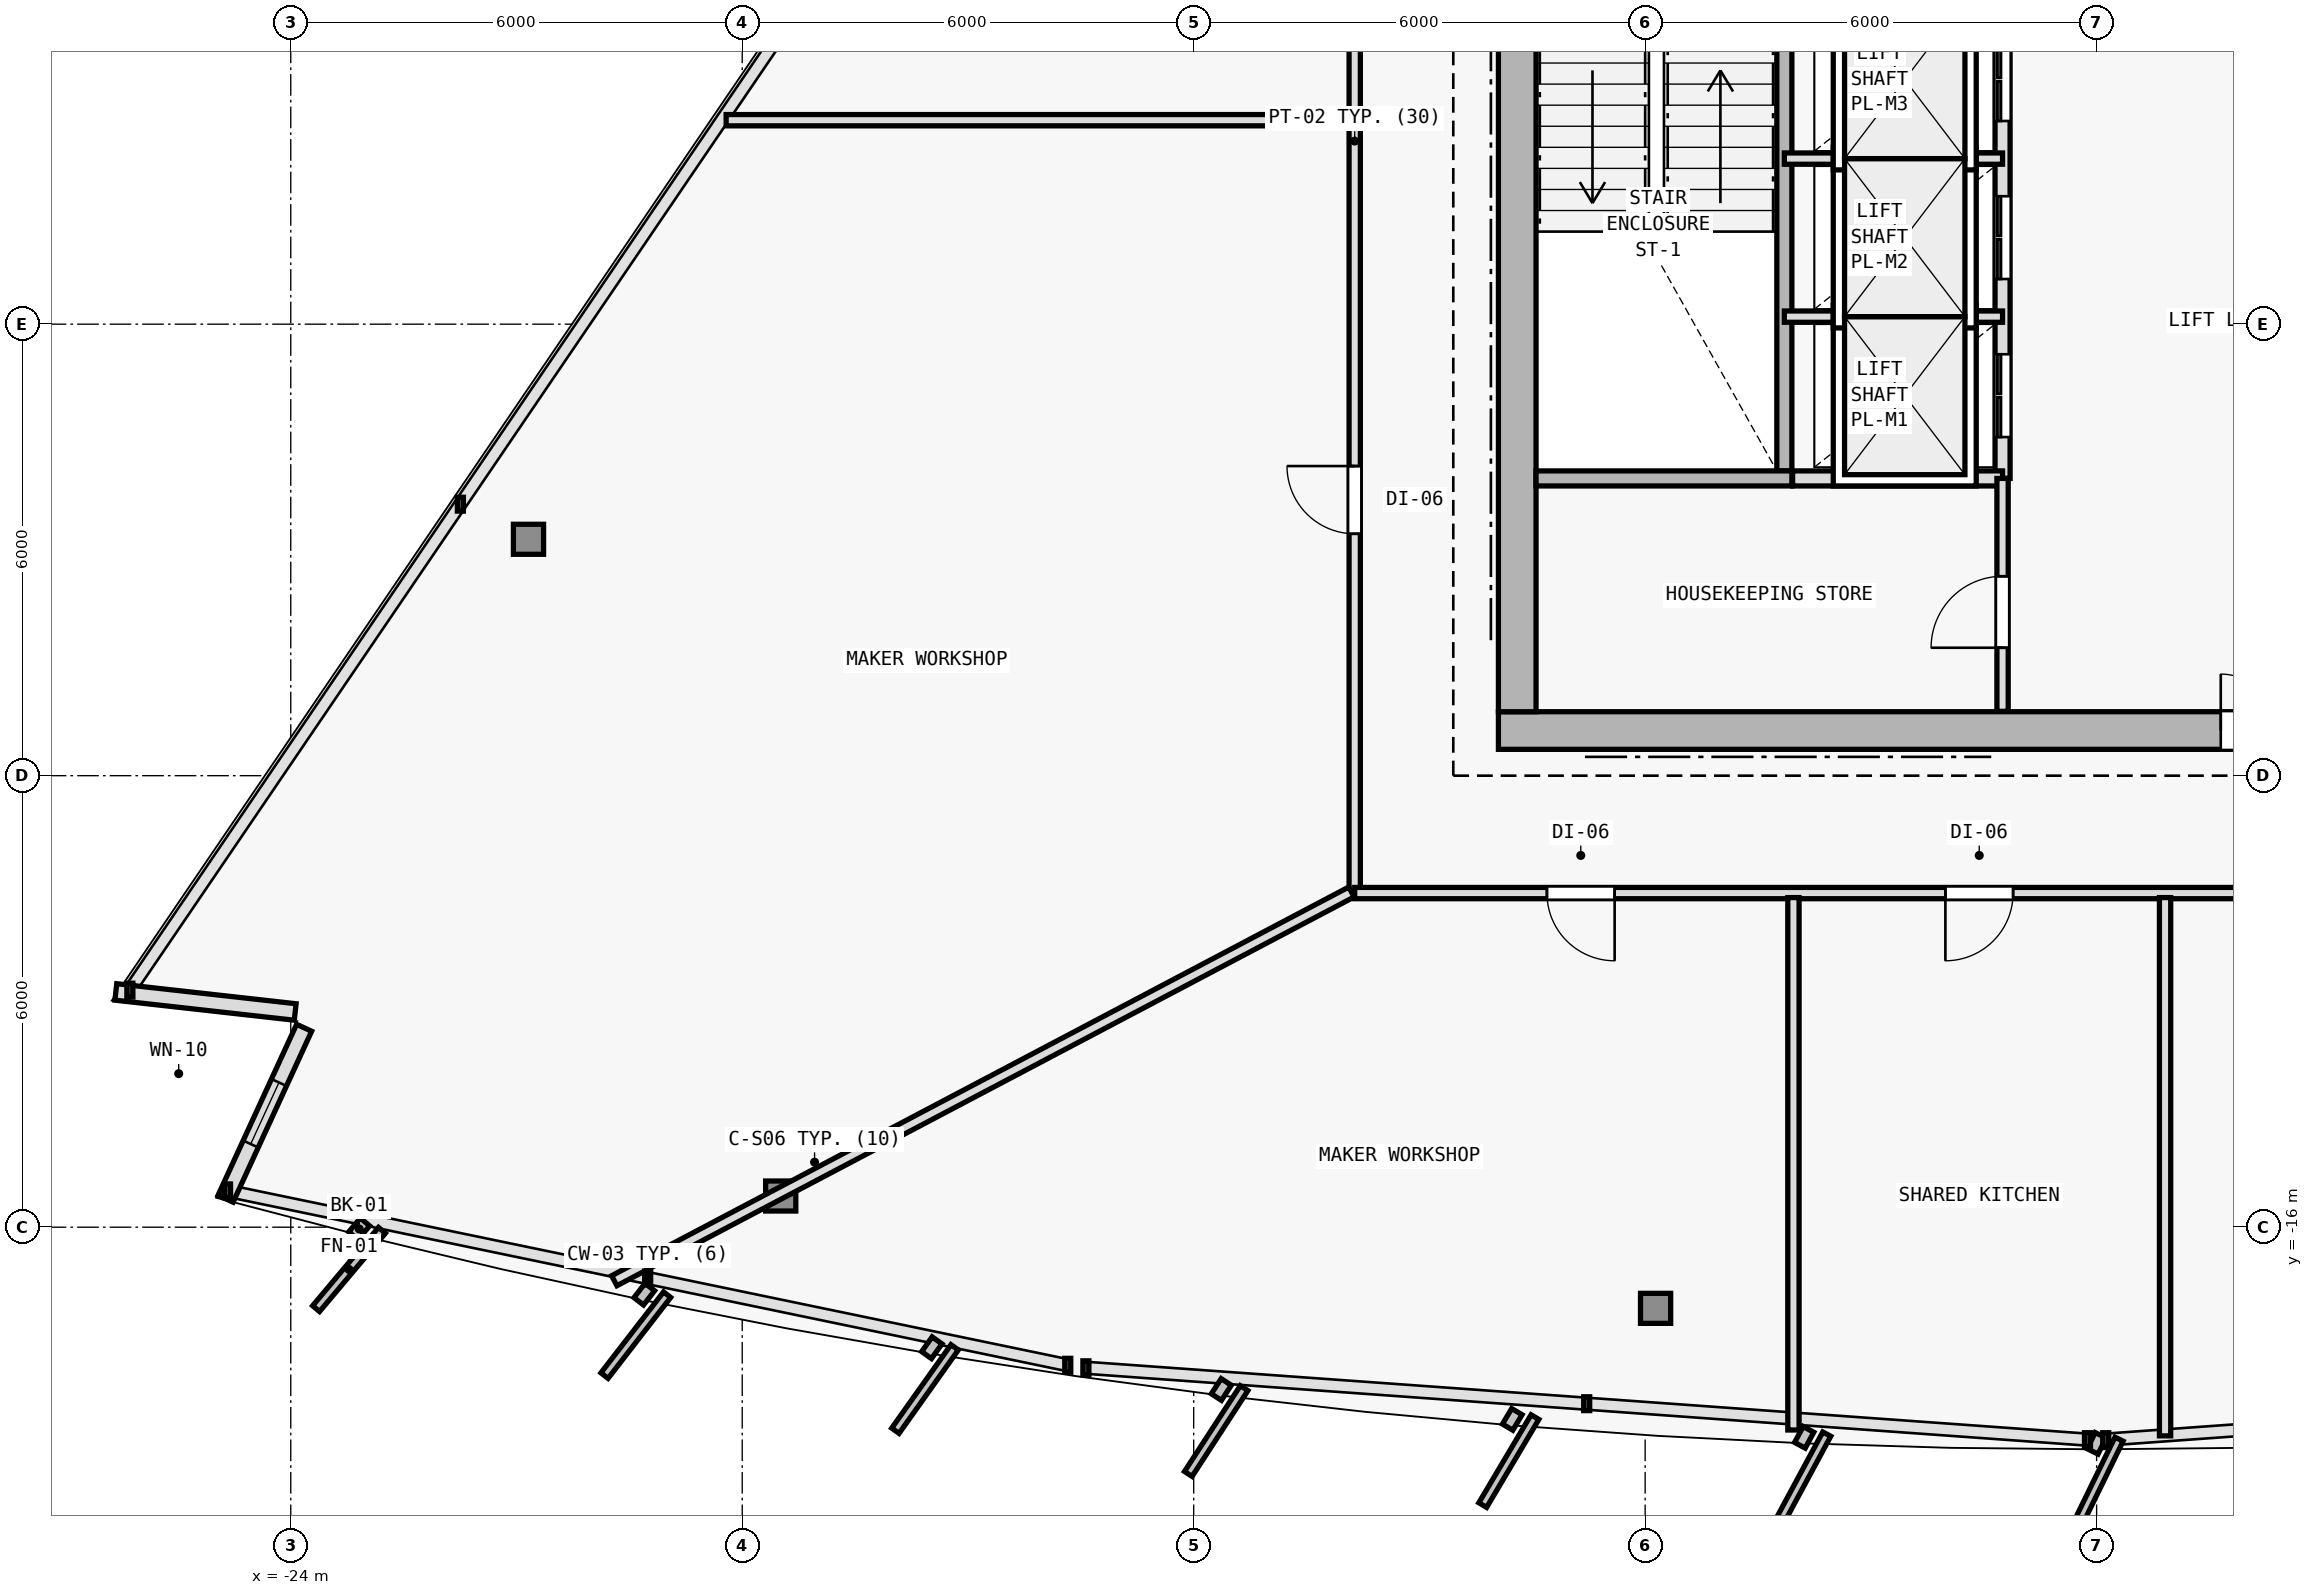
"""IFC4 building model, lengths in metres.
Left out: names, types, materials, properties, quantities, classifications, styles, units other than length and angle.
Written with IfcOpenShell. Run it as: python <this file> out.ifc"""

import sys

from ifc_helpers import new_model, si_unit, direction, frame, frame_2d, origin, origin_2d, place, context, subcontext, project, spatial, rectangle, i_section, extrude, element, fill, save


model = new_model("IFC4")
c1 = context("Model", 3, precision=1e-05, world=origin(), true_north=direction((0.0, 1.0)))
c2 = subcontext(c1, "Body", "Model", "MODEL_VIEW")
j1 = project(units=[si_unit("LENGTHUNIT", "METRE"), si_unit("PLANEANGLEUNIT", "RADIAN")], contexts=[c1])
p1 = place(None, origin())
s1 = spatial("IfcSite", under=j1, at=p1, CompositionType="ELEMENT")
p2 = place(p1, origin())
s2 = spatial("IfcBuilding", under=s1, at=p2, CompositionType="ELEMENT")
p3 = place(p2, frame((0.0, 0.0, 171.0)))
s3 = spatial("IfcBuildingStorey", under=s2, at=p3, CompositionType="ELEMENT", Elevation=171.0)
for number, where, z_axis, x_axis in (
    (1, (-7.7, -9.4, 0.0), (0.0, 0.0, 1.0), (1.0, 0.0, 0.0)),
    (2, (0.0, -9.4, 0.0), (0.0, 0.0, 1.0), (1.0, 0.0, 0.0)),
):
    element("IfcColumn", number, at=place(p3, frame(where, z_axis=z_axis, x_axis=x_axis)), inside=s3, PredefinedType="COLUMN", context=c2, shape_type="SweptSolid", body=[
        extrude(i_section(OverallWidth=0.404, OverallDepth=0.407, WebThickness=0.017, FlangeThickness=0.028, FilletRadius=0.015, at=origin_2d()), origin(), (0.0, 0.0, 1.0), 3.6),
    ])
p4 = place(p3, frame((-17.489, -15.586, 0.006), z_axis=(0.020596292833, 0.033511459955, 0.999226087917), x_axis=(-0.851954850327, 0.523615252838, 0.0)))
e3 = element("IfcColumn", 3, at=p4, inside=s3, PredefinedType="COLUMN", context=c2, shape_type="SweptSolid", body=[
    extrude(i_section(OverallWidth=0.401, OverallDepth=0.399, WebThickness=0.016, FlangeThickness=0.025, FilletRadius=0.015, at=origin_2d()), origin(), (0.0, 0.0, 1.0), 3.592),
])
p5 = place(p3, frame((-5.861, -17.079, 0.006), z_axis=(0.006934288159, 0.035283289748, 0.999353293441), x_axis=(-0.981229659911, 0.192842823335, 0.0)))
e4 = element("IfcColumn", 4, at=p5, inside=s3, PredefinedType="COLUMN", context=c2, shape_type="SweptSolid", body=[
    extrude(i_section(OverallWidth=0.401, OverallDepth=0.399, WebThickness=0.016, FlangeThickness=0.025, FilletRadius=0.015, at=origin_2d()), origin(), (0.0, 0.0, 1.0), 3.591),
])
p6 = place(p3, frame((-20.841, -6.859, 0.006), z_axis=(0.025224163578, 0.021620711639, 0.999447990843), x_axis=(-0.650791373456, 0.759256602365, 0.0)))
e5 = element("IfcColumn", 5, at=p6, inside=s3, PredefinedType="COLUMN", context=c2, shape_type="SweptSolid", body=[
    extrude(i_section(OverallWidth=0.401, OverallDepth=0.399, WebThickness=0.016, FlangeThickness=0.025, FilletRadius=0.015, at=origin_2d()), origin(), (0.0, 0.0, 1.0), 3.591),
])
p7 = place(p3, frame((-23.941, -13.14, 0.0), z_axis=(0.0, 0.0, 1.0), x_axis=(-0.993825249999, 0.110956624245, 0.0)))
e6 = element("IfcWall", 6, at=p7, inside=s3, PredefinedType="SOLIDWALL", context=c2, shape_type="SweptSolid", body=[
    extrude(rectangle(XDim=2.398, YDim=0.22, at=frame_2d((1.199, 0.0))), origin(), (0.0, 0.0, 1.0), 3.35),
])
p8 = place(p3, frame((-24.866, -15.622, 0.0), z_axis=(0.0, 0.0, 1.0), x_axis=(0.417478378529, 0.908686856657, 0.0)))
e7 = element("IfcWall", 7, at=p8, inside=s3, PredefinedType="SOLIDWALL", context=c2, shape_type="SweptSolid", body=[
    extrude(rectangle(XDim=2.5, YDim=0.22, at=frame_2d((1.25, 0.0))), origin(), (0.0, 0.0, 1.0), 3.35),
])
p9 = place(p8, frame((0.8, 0.0, 0.62)))
e8 = element("IfcOpeningElement", 8, at=p9, cuts=e7, PredefinedType="OPENING", context=c2, shape_type="SweptSolid", body=[
    extrude(rectangle(XDim=0.9, YDim=1.6, at=frame_2d((0.45, 0.8))), frame((0.0, 0.12, 0.0), z_axis=(0.0, -1.0, 0.0), x_axis=(1.0, 0.0, 0.0)), (0.0, 0.0, 1.0), 0.24),
])
p10 = place(p3, frame((-7.95, -9.4, 0.0), z_axis=(0.0, 0.0, 1.0), x_axis=(1.0, 0.0, 0.0)))
e9 = element("IfcWall", 9, at=p10, inside=s3, PredefinedType="SHEAR", context=c2, shape_type="SweptSolid", body=[
    extrude(rectangle(XDim=15.9, YDim=0.5, at=frame_2d((7.95, 0.0))), origin(), (0.0, 0.0, 1.0), 3.35),
])
p11 = place(p10, frame((9.6, 0.0, 0.0)))
e10 = element("IfcOpeningElement", 10, at=p11, cuts=e9, PredefinedType="OPENING", context=c2, shape_type="SweptSolid", body=[
    extrude(rectangle(XDim=1.5, YDim=2.2, at=frame_2d((0.75, 1.1))), frame((0.0, 0.26, 0.0), z_axis=(0.0, -1.0, 0.0), x_axis=(1.0, 0.0, 0.0)), (0.0, 0.0, 1.0), 0.52),
])
p12 = place(p3, frame((-7.7, -9.15, 0.0), z_axis=(0.0, 0.0, 1.0), x_axis=(0.0, 1.0, 0.0)))
e11 = element("IfcWall", 11, at=p12, inside=s3, PredefinedType="SHEAR", context=c2, shape_type="SweptSolid", body=[
    extrude(rectangle(XDim=19.1, YDim=0.5, at=frame_2d((9.55, 0.0))), origin(), (0.0, 0.0, 1.0), 3.35),
])
p13 = place(p12, frame((12.7, 0.0, 0.0)))
e12 = element("IfcOpeningElement", 12, at=p13, cuts=e11, PredefinedType="OPENING", context=c2, shape_type="SweptSolid", body=[
    extrude(rectangle(XDim=1.1, YDim=2.15, at=frame_2d((0.55, 1.075))), frame((0.0, 0.26, 0.0), z_axis=(0.0, -1.0, 0.0), x_axis=(1.0, 0.0, 0.0)), (0.0, 0.0, 1.0), 0.52),
])
p14 = place(p3, frame((-4.15, -5.95, 0.0), z_axis=(0.0, 0.0, 1.0), x_axis=(0.0, 1.0, 0.0)))
e13 = element("IfcWall", 13, at=p14, inside=s3, PredefinedType="SOLIDWALL", context=c2, shape_type="SweptSolid", body=[
    extrude(rectangle(XDim=7.2, YDim=0.2, at=frame_2d((3.6, 0.0))), origin(), (0.0, 0.0, 1.0), 3.35),
])
p15 = place(p3, frame((-1.25, -6.05, 0.0), z_axis=(0.0, 0.0, 1.0), x_axis=(0.0, 1.0, 0.0)))
e14 = element("IfcWall", 14, at=p15, inside=s3, PredefinedType="SOLIDWALL", context=c2, shape_type="SweptSolid", body=[
    extrude(rectangle(XDim=8.7, YDim=0.2, at=frame_2d((4.35, 0.0))), origin(), (0.0, 0.0, 1.0), 3.35),
])
p16 = place(p15, frame((0.55, 0.0, 0.0)))
e15 = element("IfcOpeningElement", 15, at=p16, cuts=e14, PredefinedType="OPENING", context=c2, shape_type="SweptSolid", body=[
    extrude(rectangle(XDim=1.1, YDim=2.15, at=frame_2d((0.55, 1.075))), frame((0.0, 0.11, 0.0), z_axis=(0.0, -1.0, 0.0), x_axis=(1.0, 0.0, 0.0)), (0.0, 0.0, 1.0), 0.22),
])
p17 = place(p15, frame((2.65, 0.0, 0.0)))
e16 = element("IfcOpeningElement", 16, at=p17, cuts=e14, PredefinedType="OPENING", context=c2, shape_type="SweptSolid", body=[
    extrude(rectangle(XDim=1.1, YDim=2.15, at=frame_2d((0.55, 1.075))), frame((0.0, 0.11, 0.0), z_axis=(0.0, -1.0, 0.0), x_axis=(1.0, 0.0, 0.0)), (0.0, 0.0, 1.0), 0.22),
])
p18 = place(p15, frame((4.75, 0.0, 0.0)))
e17 = element("IfcOpeningElement", 17, at=p18, cuts=e14, PredefinedType="OPENING", context=c2, shape_type="SweptSolid", body=[
    extrude(rectangle(XDim=1.1, YDim=2.15, at=frame_2d((0.55, 1.075))), frame((0.0, 0.11, 0.0), z_axis=(0.0, -1.0, 0.0), x_axis=(1.0, 0.0, 0.0)), (0.0, 0.0, 1.0), 0.22),
])
p19 = place(p15, frame((6.85, 0.0, 0.0)))
e18 = element("IfcOpeningElement", 18, at=p19, cuts=e14, PredefinedType="OPENING", context=c2, shape_type="SweptSolid", body=[
    extrude(rectangle(XDim=1.1, YDim=2.15, at=frame_2d((0.55, 1.075))), frame((0.0, 0.11, 0.0), z_axis=(0.0, -1.0, 0.0), x_axis=(1.0, 0.0, 0.0)), (0.0, 0.0, 1.0), 0.22),
])
for number, where, z_axis, x_axis in (
    (19, (-4.15, -3.9, 0.0), (0.0, 0.0, 1.0), (1.0, 0.0, 0.0)),
    (20, (-4.15, -1.8, 0.0), (0.0, 0.0, 1.0), (1.0, 0.0, 0.0)),
):
    element("IfcWall", number, at=place(p3, frame(where, z_axis=z_axis, x_axis=x_axis)), inside=s3, PredefinedType="PARTITIONING", context=c2, shape_type="SweptSolid", body=[
        extrude(rectangle(XDim=2.9, YDim=0.15, at=frame_2d((1.45, 0.0))), origin(), (0.0, 0.0, 1.0), 3.35),
    ])
p20 = place(p3, frame((-7.45, -6.05, 0.0), z_axis=(0.0, 0.0, 1.0), x_axis=(1.0, 0.0, 0.0)))
e21 = element("IfcWall", 21, at=p20, inside=s3, PredefinedType="SOLIDWALL", context=c2, shape_type="SweptSolid", body=[
    extrude(rectangle(XDim=3.4, YDim=0.2, at=frame_2d((1.7, 0.0))), origin(), (0.0, 0.0, 1.0), 3.35),
])
p21 = place(p3, frame((-4.04, -6.05, 0.0), z_axis=(0.0, 0.0, 1.0), x_axis=(1.0, 0.0, 0.0)))
e22 = element("IfcWall", 22, at=p21, inside=s3, PredefinedType="SOLIDWALL", context=c2, shape_type="SweptSolid", body=[
    extrude(rectangle(XDim=2.79, YDim=0.2, at=frame_2d((1.395, 0.0))), origin(), (0.0, 0.0, 1.0), 3.35),
])
p22 = place(p3, frame((-1.25, -9.145, 0.0), z_axis=(0.0, 0.0, 1.0), x_axis=(0.0, 1.0, 0.0)))
e23 = element("IfcWall", 23, at=p22, inside=s3, PredefinedType="PARTITIONING", context=c2, shape_type="SweptSolid", body=[
    extrude(rectangle(XDim=3.095, YDim=0.15, at=frame_2d((1.547, 0.0))), origin(), (0.0, 0.0, 1.0), 3.35),
])
p23 = place(p22, frame((0.845, 0.0, 0.0)))
e24 = element("IfcOpeningElement", 24, at=p23, cuts=e23, PredefinedType="OPENING", context=c2, shape_type="SweptSolid", body=[
    extrude(rectangle(XDim=0.95, YDim=2.1, at=frame_2d((0.475, 1.05))), frame((0.0, 0.085, 0.0), z_axis=(0.0, -1.0, 0.0), x_axis=(1.0, 0.0, 0.0)), (0.0, 0.0, 1.0), 0.17),
])
p24 = place(p3, frame((-9.86, -11.56, 0.0), z_axis=(0.0, 0.0, 1.0), x_axis=(0.0, 1.0, 0.0)))
e25 = element("IfcWall", 25, at=p24, inside=s3, PredefinedType="PARTITIONING", context=c2, shape_type="SweptSolid", body=[
    extrude(rectangle(XDim=19.986, YDim=0.15, at=frame_2d((9.993, 0.0))), origin(), (0.0, 0.0, 1.0), 2.825),
])
p25 = place(p24, frame((4.774, 0.0, 0.0)))
e26 = element("IfcOpeningElement", 26, at=p25, cuts=e25, PredefinedType="OPENING", context=c2, shape_type="SweptSolid", body=[
    extrude(rectangle(XDim=0.9, YDim=2.1, at=frame_2d((0.45, 1.05))), frame((0.0, 0.085, 0.0), z_axis=(0.0, -1.0, 0.0), x_axis=(1.0, 0.0, 0.0)), (0.0, 0.0, 1.0), 0.17),
])
p26 = place(p24, frame((14.589, 0.0, 0.0)))
e27 = element("IfcOpeningElement", 27, at=p26, cuts=e25, PredefinedType="OPENING", context=c2, shape_type="SweptSolid", body=[
    extrude(rectangle(XDim=0.9, YDim=2.1, at=frame_2d((0.45, 1.05))), frame((0.0, 0.085, 0.0), z_axis=(0.0, -1.0, 0.0), x_axis=(1.0, 0.0, 0.0)), (0.0, 0.0, 1.0), 0.17),
])
p27 = place(p3, frame((13.18, -11.56, 0.0), z_axis=(0.0, 0.0, 1.0), x_axis=(-1.0, 0.0, 0.0)))
e28 = element("IfcWall", 28, at=p27, inside=s3, PredefinedType="PARTITIONING", context=c2, shape_type="SweptSolid", body=[
    extrude(rectangle(XDim=23.04, YDim=0.15, at=frame_2d((11.52, 0.0))), origin(), (0.0, 0.0, 1.0), 2.825),
])
p28 = place(p27, frame((19.585, 0.0, 0.0)))
e29 = element("IfcOpeningElement", 29, at=p28, cuts=e28, PredefinedType="OPENING", context=c2, shape_type="SweptSolid", body=[
    extrude(rectangle(XDim=0.9, YDim=2.1, at=frame_2d((0.45, 1.05))), frame((0.0, 0.085, 0.0), z_axis=(0.0, -1.0, 0.0), x_axis=(1.0, 0.0, 0.0)), (0.0, 0.0, 1.0), 0.17),
])
p29 = place(p27, frame((14.29, 0.0, 0.0)))
e30 = element("IfcOpeningElement", 30, at=p29, cuts=e28, PredefinedType="OPENING", context=c2, shape_type="SweptSolid", body=[
    extrude(rectangle(XDim=0.9, YDim=2.1, at=frame_2d((0.45, 1.05))), frame((0.0, 0.085, 0.0), z_axis=(0.0, -1.0, 0.0), x_axis=(1.0, 0.0, 0.0)), (0.0, 0.0, 1.0), 0.17),
])
p30 = place(p27, frame((9.351, 0.0, 0.0)))
e31 = element("IfcOpeningElement", 31, at=p30, cuts=e28, PredefinedType="OPENING", context=c2, shape_type="SweptSolid", body=[
    extrude(rectangle(XDim=0.9, YDim=2.1, at=frame_2d((0.45, 1.05))), frame((0.0, 0.085, 0.0), z_axis=(0.0, -1.0, 0.0), x_axis=(1.0, 0.0, 0.0)), (0.0, 0.0, 1.0), 0.17),
])
p31 = place(p27, frame((3.305, 0.0, 0.0)))
e32 = element("IfcOpeningElement", 32, at=p31, cuts=e28, PredefinedType="OPENING", context=c2, shape_type="SweptSolid", body=[
    extrude(rectangle(XDim=0.9, YDim=2.1, at=frame_2d((0.45, 1.05))), frame((0.0, 0.085, 0.0), z_axis=(0.0, -1.0, 0.0), x_axis=(1.0, 0.0, 0.0)), (0.0, 0.0, 1.0), 0.17),
])
p32 = place(p3, frame((-9.903, -11.546, 0.0), z_axis=(0.0, 0.0, 1.0), x_axis=(-0.884581832764, -0.46638501385, 0.0)))
e33 = element("IfcWall", 33, at=p32, inside=s3, PredefinedType="PARTITIONING", context=c2, shape_type="SweptSolid", body=[
    extrude(rectangle(XDim=11.075, YDim=0.15, at=frame_2d((5.538, 0.0))), origin(), (0.0, 0.0, 1.0), 2.775),
])
p33 = place(p3, frame((-9.92, -1.29, 0.0), z_axis=(0.0, 0.0, 1.0), x_axis=(-1.0, 0.0, 0.0)))
e34 = element("IfcWall", 34, at=p33, inside=s3, PredefinedType="PARTITIONING", context=c2, shape_type="SweptSolid", body=[
    extrude(rectangle(XDim=8.294, YDim=0.15, at=frame_2d((4.147, 0.0))), origin(), (0.0, 0.0, 1.0), 2.775),
])
p34 = place(p3, frame((-4.029, -11.62, 0.0), z_axis=(0.0, 0.0, 1.0), x_axis=(0.0, -1.0, 0.0)))
e35 = element("IfcWall", 35, at=p34, inside=s3, PredefinedType="PARTITIONING", context=c2, shape_type="SweptSolid", body=[
    extrude(rectangle(XDim=7.075, YDim=0.15, at=frame_2d((3.538, 0.0))), origin(), (0.0, 0.0, 1.0), 2.775),
])
p35 = place(p3, frame((0.91, -11.62, 0.0), z_axis=(0.0, 0.0, 1.0), x_axis=(0.0, -1.0, 0.0)))
e36 = element("IfcWall", 36, at=p35, inside=s3, PredefinedType="PARTITIONING", context=c2, shape_type="SweptSolid", body=[
    extrude(rectangle(XDim=7.153, YDim=0.15, at=frame_2d((3.576, 0.0))), origin(), (0.0, 0.0, 1.0), 2.875),
])
p36 = place(p9, origin())
e37 = element("IfcWindow", 37, at=p36, inside=s3, PartitioningType="SINGLE_PANEL", PredefinedType="WINDOW", context=c2, shape_type="SweptSolid", body=[
    extrude(rectangle(XDim=0.9, YDim=1.6, at=frame_2d((0.45, 0.8))), frame((0.0, 0.03, 0.0), z_axis=(0.0, -1.0, 0.0), x_axis=(1.0, 0.0, 0.0)), (0.0, 0.0, 1.0), 0.06),
])
fill(e8, e37)
p37 = place(p11, origin())
e38 = element("IfcDoor", 38, at=p37, inside=s3, OperationType="DOUBLE_DOOR_SINGLE_SWING", PredefinedType="DOOR", context=c2, shape_type="SweptSolid", body=[
    extrude(rectangle(XDim=1.5, YDim=2.2, at=frame_2d((0.75, 1.1))), frame((0.0, 0.025, 0.0), z_axis=(0.0, -1.0, 0.0), x_axis=(1.0, 0.0, 0.0)), (0.0, 0.0, 1.0), 0.05),
])
fill(e10, e38)
p38 = place(p16, origin())
e39 = element("IfcDoor", 39, at=p38, inside=s3, OperationType="DOUBLE_DOOR_SLIDING", PredefinedType="DOOR", context=c2, shape_type="SweptSolid", body=[
    extrude(rectangle(XDim=1.1, YDim=2.15, at=frame_2d((0.55, 1.075))), frame((0.0, 0.025, 0.0), z_axis=(0.0, -1.0, 0.0), x_axis=(1.0, 0.0, 0.0)), (0.0, 0.0, 1.0), 0.05),
])
fill(e15, e39)
p39 = place(p17, origin())
e40 = element("IfcDoor", 40, at=p39, inside=s3, OperationType="DOUBLE_DOOR_SLIDING", PredefinedType="DOOR", context=c2, shape_type="SweptSolid", body=[
    extrude(rectangle(XDim=1.1, YDim=2.15, at=frame_2d((0.55, 1.075))), frame((0.0, 0.025, 0.0), z_axis=(0.0, -1.0, 0.0), x_axis=(1.0, 0.0, 0.0)), (0.0, 0.0, 1.0), 0.05),
])
fill(e16, e40)
p40 = place(p18, origin())
e41 = element("IfcDoor", 41, at=p40, inside=s3, OperationType="DOUBLE_DOOR_SLIDING", PredefinedType="DOOR", context=c2, shape_type="SweptSolid", body=[
    extrude(rectangle(XDim=1.1, YDim=2.15, at=frame_2d((0.55, 1.075))), frame((0.0, 0.025, 0.0), z_axis=(0.0, -1.0, 0.0), x_axis=(1.0, 0.0, 0.0)), (0.0, 0.0, 1.0), 0.05),
])
fill(e17, e41)
p41 = place(p23, origin())
e42 = element("IfcDoor", 42, at=p41, inside=s3, OperationType="SINGLE_SWING_LEFT", PredefinedType="DOOR", context=c2, shape_type="SweptSolid", body=[
    extrude(rectangle(XDim=0.95, YDim=2.1, at=frame_2d((0.475, 1.05))), frame((0.0, 0.025, 0.0), z_axis=(0.0, -1.0, 0.0), x_axis=(1.0, 0.0, 0.0)), (0.0, 0.0, 1.0), 0.05),
])
fill(e24, e42)
p42 = place(p25, origin())
e43 = element("IfcDoor", 43, at=p42, inside=s3, OperationType="SINGLE_SWING_RIGHT", PredefinedType="DOOR", context=c2, shape_type="SweptSolid", body=[
    extrude(rectangle(XDim=0.9, YDim=2.1, at=frame_2d((0.45, 1.05))), frame((0.0, 0.025, 0.0), z_axis=(0.0, -1.0, 0.0), x_axis=(1.0, 0.0, 0.0)), (0.0, 0.0, 1.0), 0.05),
])
fill(e26, e43)
p43 = place(p28, origin())
e44 = element("IfcDoor", 44, at=p43, inside=s3, OperationType="SINGLE_SWING_LEFT", PredefinedType="DOOR", context=c2, shape_type="SweptSolid", body=[
    extrude(rectangle(XDim=0.9, YDim=2.1, at=frame_2d((0.45, 1.05))), frame((0.0, 0.025, 0.0), z_axis=(0.0, -1.0, 0.0), x_axis=(1.0, 0.0, 0.0)), (0.0, 0.0, 1.0), 0.05),
])
fill(e29, e44)
p44 = place(p29, origin())
e45 = element("IfcDoor", 45, at=p44, inside=s3, OperationType="SINGLE_SWING_RIGHT", PredefinedType="DOOR", context=c2, shape_type="SweptSolid", body=[
    extrude(rectangle(XDim=0.9, YDim=2.1, at=frame_2d((0.45, 1.05))), frame((0.0, 0.025, 0.0), z_axis=(0.0, -1.0, 0.0), x_axis=(1.0, 0.0, 0.0)), (0.0, 0.0, 1.0), 0.05),
])
fill(e30, e45)
save(model, sys.argv[1])
